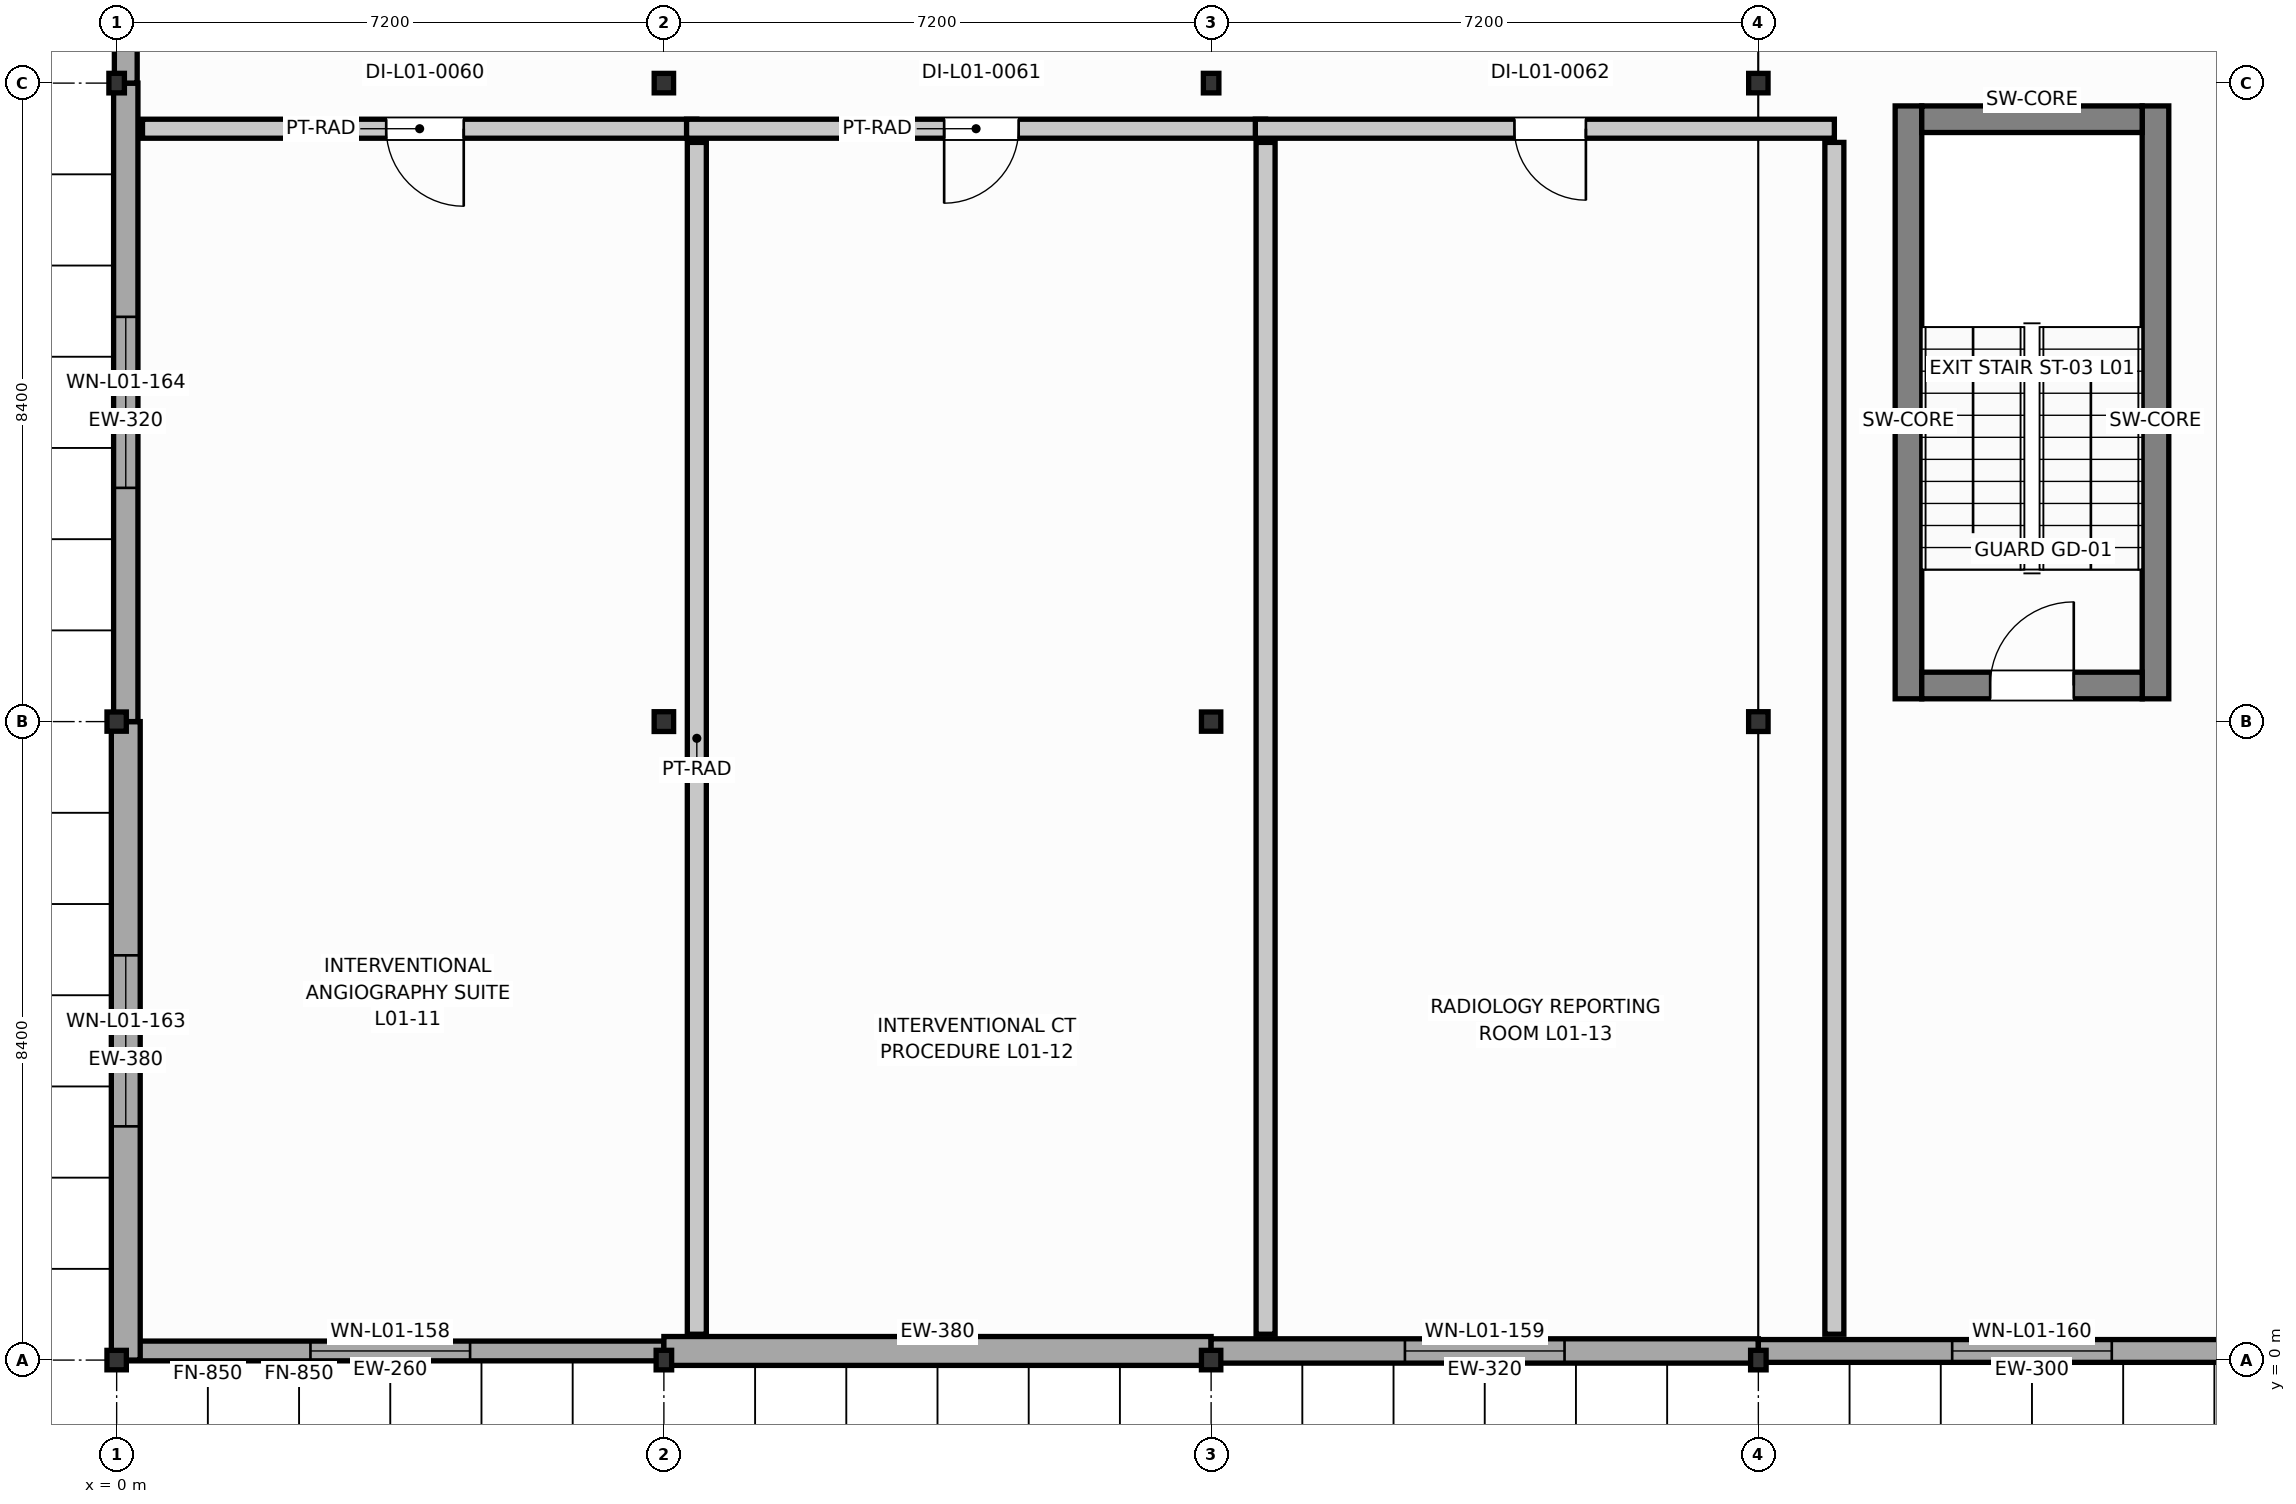
"""IFC4 building model, lengths in metres.
Left out: names, types, materials, properties, quantities, classifications, styles, units other than length and angle.
Written with IfcOpenShell. Run it as: python <this file> out.ifc"""

import sys

from ifc_helpers import new_model, si_unit, direction, frame, frame_2d, origin, origin_with_axes, origin_2d, place, context, subcontext, project, spatial, rectangle, i_section, extrude, element, fill, save


model = new_model("IFC4")
c1 = context("Model", 3, precision=1e-05, world=origin(), true_north=direction((0.0, 1.0)))
c2 = subcontext(c1, "Body", "Model", "MODEL_VIEW")
j1 = project(units=[si_unit("LENGTHUNIT", "METRE"), si_unit("PLANEANGLEUNIT", "RADIAN")], contexts=[c1])
p1 = place(None, origin())
s1 = spatial("IfcSite", under=j1, at=p1, CompositionType="ELEMENT")
p2 = place(p1, origin())
s2 = spatial("IfcBuilding", under=s1, at=p2, CompositionType="ELEMENT")
p3 = place(p2, frame((0.0, 0.0, 4.8)))
s3 = spatial("IfcBuildingStorey", under=s2, at=p3, CompositionType="ELEMENT", Elevation=4.8)
p4 = place(p3, origin_with_axes())
e1 = element("IfcColumn", 1, at=p4, inside=s3, PredefinedType="COLUMN", context=c2, shape_type="SweptSolid", body=[
    extrude(i_section(OverallWidth=0.255, OverallDepth=0.256, WebThickness=0.01, FlangeThickness=0.016, FilletRadius=0.013, at=origin_2d()), origin(), (0.0, 0.0, 1.0), 4.2),
])
p5 = place(p3, frame((0.0, 8.4, 0.0), z_axis=(0.0, 0.0, 1.0), x_axis=(1.0, 0.0, 0.0)))
e2 = element("IfcColumn", 2, at=p5, inside=s3, PredefinedType="COLUMN", context=c2, shape_type="SweptSolid", body=[
    extrude(i_section(OverallWidth=0.254, OverallDepth=0.253, WebThickness=0.009, FlangeThickness=0.014, FilletRadius=0.013, at=origin_2d()), origin(), (0.0, 0.0, 1.0), 4.2),
])
for number, where, z_axis, x_axis in (
    (3, (0.0, 16.8, 0.0), (0.0, 0.0, 1.0), (1.0, 0.0, 0.0)),
    (4, (7.2, 0.0, 0.0), (0.0, 0.0, 1.0), (1.0, 0.0, 0.0)),
):
    element("IfcColumn", number, at=place(p3, frame(where, z_axis=z_axis, x_axis=x_axis)), inside=s3, PredefinedType="COLUMN", context=c2, shape_type="SweptSolid", body=[
        extrude(i_section(OverallWidth=0.204, OverallDepth=0.257, WebThickness=0.009, FlangeThickness=0.016, FilletRadius=0.013, at=origin_2d()), origin(), (0.0, 0.0, 1.0), 4.2),
    ])
p6 = place(p3, frame((7.2, 8.4, 0.0), z_axis=(0.0, 0.0, 1.0), x_axis=(1.0, 0.0, 0.0)))
e5 = element("IfcColumn", 5, at=p6, inside=s3, PredefinedType="COLUMN", context=c2, shape_type="SweptSolid", body=[
    extrude(i_section(OverallWidth=0.256, OverallDepth=0.26, WebThickness=0.011, FlangeThickness=0.017, FilletRadius=0.013, at=origin_2d()), origin(), (0.0, 0.0, 1.0), 4.2),
])
for number, where, z_axis, x_axis in (
    (6, (7.2, 16.8, 0.0), (0.0, 0.0, 1.0), (1.0, 0.0, 0.0)),
    (7, (14.4, 0.0, 0.0), (0.0, 0.0, 1.0), (1.0, 0.0, 0.0)),
):
    element("IfcColumn", number, at=place(p3, frame(where, z_axis=z_axis, x_axis=x_axis)), inside=s3, PredefinedType="COLUMN", context=c2, shape_type="SweptSolid", body=[
        extrude(i_section(OverallWidth=0.255, OverallDepth=0.256, WebThickness=0.01, FlangeThickness=0.016, FilletRadius=0.013, at=origin_2d()), origin(), (0.0, 0.0, 1.0), 4.2),
    ])
p7 = place(p3, frame((14.4, 8.4, 0.0), z_axis=(0.0, 0.0, 1.0), x_axis=(1.0, 0.0, 0.0)))
e8 = element("IfcColumn", 8, at=p7, inside=s3, PredefinedType="COLUMN", context=c2, shape_type="SweptSolid", body=[
    extrude(i_section(OverallWidth=0.254, OverallDepth=0.253, WebThickness=0.009, FlangeThickness=0.014, FilletRadius=0.013, at=origin_2d()), origin(), (0.0, 0.0, 1.0), 4.2),
])
for number, where, z_axis, x_axis in (
    (9, (14.4, 16.8, 0.0), (0.0, 0.0, 1.0), (1.0, 0.0, 0.0)),
    (10, (21.6, 0.0, 0.0), (0.0, 0.0, 1.0), (1.0, 0.0, 0.0)),
):
    element("IfcColumn", number, at=place(p3, frame(where, z_axis=z_axis, x_axis=x_axis)), inside=s3, PredefinedType="COLUMN", context=c2, shape_type="SweptSolid", body=[
        extrude(i_section(OverallWidth=0.204, OverallDepth=0.257, WebThickness=0.009, FlangeThickness=0.016, FilletRadius=0.013, at=origin_2d()), origin(), (0.0, 0.0, 1.0), 4.2),
    ])
p8 = place(p3, frame((21.6, 8.4, 0.0), z_axis=(0.0, 0.0, 1.0), x_axis=(1.0, 0.0, 0.0)))
e11 = element("IfcColumn", 11, at=p8, inside=s3, PredefinedType="COLUMN", context=c2, shape_type="SweptSolid", body=[
    extrude(i_section(OverallWidth=0.256, OverallDepth=0.26, WebThickness=0.011, FlangeThickness=0.017, FilletRadius=0.013, at=origin_2d()), origin(), (0.0, 0.0, 1.0), 4.2),
])
p9 = place(p3, frame((21.6, 16.8, 0.0), z_axis=(0.0, 0.0, 1.0), x_axis=(1.0, 0.0, 0.0)))
e12 = element("IfcColumn", 12, at=p9, inside=s3, PredefinedType="COLUMN", context=c2, shape_type="SweptSolid", body=[
    extrude(i_section(OverallWidth=0.255, OverallDepth=0.256, WebThickness=0.01, FlangeThickness=0.016, FilletRadius=0.013, at=origin_2d()), origin(), (0.0, 0.0, 1.0), 4.2),
])
for number, where, z_axis, x_axis in (
    (13, (23.575, 8.7, 0.0), (0.0, 0.0, 1.0), (0.0, 1.0, 0.0)),
    (14, (26.825, 8.7, 0.0), (0.0, 0.0, 1.0), (0.0, 1.0, 0.0)),
):
    element("IfcWall", number, at=place(p3, frame(where, z_axis=z_axis, x_axis=x_axis)), inside=s3, PredefinedType="SHEAR", context=c2, shape_type="SweptSolid", body=[
        extrude(rectangle(XDim=7.8, YDim=0.35, at=frame_2d((3.9, 0.0))), origin(), (0.0, 0.0, 1.0), 3.96),
    ])
p10 = place(p3, frame((23.75, 16.325, 0.0), z_axis=(0.0, 0.0, 1.0), x_axis=(1.0, 0.0, 0.0)))
e15 = element("IfcWall", 15, at=p10, inside=s3, PredefinedType="SHEAR", context=c2, shape_type="SweptSolid", body=[
    extrude(rectangle(XDim=2.9, YDim=0.35, at=frame_2d((1.45, 0.0))), origin(), (0.0, 0.0, 1.0), 3.96),
])
p11 = place(p3, frame((23.75, 8.875, 0.0), z_axis=(0.0, 0.0, 1.0), x_axis=(1.0, 0.0, 0.0)))
e16 = element("IfcWall", 16, at=p11, inside=s3, PredefinedType="SHEAR", context=c2, shape_type="SweptSolid", body=[
    extrude(rectangle(XDim=2.9, YDim=0.35, at=frame_2d((1.45, 0.0))), origin(), (0.0, 0.0, 1.0), 3.96),
])
p12 = place(p11, frame((0.9, 0.0, 0.0)))
e17 = element("IfcOpeningElement", 17, at=p12, cuts=e16, PredefinedType="OPENING", context=c2, shape_type="SweptSolid", body=[
    extrude(rectangle(XDim=1.1, YDim=2.15, at=frame_2d((0.55, 1.075))), frame((0.0, 0.185, 0.0), z_axis=(0.0, -1.0, 0.0), x_axis=(1.0, 0.0, 0.0)), (0.0, 0.0, 1.0), 0.37),
])
p13 = place(p3, frame((0.0, 0.12, 0.0), z_axis=(0.0, 0.0, 1.0), x_axis=(1.0, 0.0, 0.0)))
e18 = element("IfcWall", 18, at=p13, inside=s3, PredefinedType="SOLIDWALL", context=c2, shape_type="SweptSolid", body=[
    extrude(rectangle(XDim=7.2, YDim=0.26, at=frame_2d((3.6, 0.0))), origin(), (0.0, 0.0, 1.0), 3.482),
])
p14 = place(p13, frame((2.55, 0.0, 0.95)))
e19 = element("IfcOpeningElement", 19, at=p14, cuts=e18, PredefinedType="OPENING", context=c2, shape_type="SweptSolid", body=[
    extrude(rectangle(XDim=2.1, YDim=1.35, at=frame_2d((1.05, 0.675))), frame((0.0, 0.14, 0.0), z_axis=(0.0, -1.0, 0.0), x_axis=(1.0, 0.0, 0.0)), (0.0, 0.0, 1.0), 0.28),
])
p15 = place(p3, frame((7.2, 0.12, 0.0), z_axis=(0.0, 0.0, 1.0), x_axis=(1.0, 0.0, 0.0)))
e20 = element("IfcWall", 20, at=p15, inside=s3, PredefinedType="SOLIDWALL", context=c2, shape_type="SweptSolid", body=[
    extrude(rectangle(XDim=7.2, YDim=0.38, at=frame_2d((3.6, 0.0))), origin(), (0.0, 0.0, 1.0), 3.482),
])
p16 = place(p3, frame((14.4, 0.12, 0.0), z_axis=(0.0, 0.0, 1.0), x_axis=(1.0, 0.0, 0.0)))
e21 = element("IfcWall", 21, at=p16, inside=s3, PredefinedType="SOLIDWALL", context=c2, shape_type="SweptSolid", body=[
    extrude(rectangle(XDim=7.2, YDim=0.32, at=frame_2d((3.6, 0.0))), origin(), (0.0, 0.0, 1.0), 3.482),
])
p17 = place(p16, frame((2.55, 0.0, 0.95)))
e22 = element("IfcOpeningElement", 22, at=p17, cuts=e21, PredefinedType="OPENING", context=c2, shape_type="SweptSolid", body=[
    extrude(rectangle(XDim=2.1, YDim=1.55, at=frame_2d((1.05, 0.775))), frame((0.0, 0.17, 0.0), z_axis=(0.0, -1.0, 0.0), x_axis=(1.0, 0.0, 0.0)), (0.0, 0.0, 1.0), 0.34),
])
p18 = place(p3, frame((21.6, 0.12, 0.0), z_axis=(0.0, 0.0, 1.0), x_axis=(1.0, 0.0, 0.0)))
e23 = element("IfcWall", 23, at=p18, inside=s3, PredefinedType="SOLIDWALL", context=c2, shape_type="SweptSolid", body=[
    extrude(rectangle(XDim=7.2, YDim=0.3, at=frame_2d((3.6, 0.0))), origin(), (0.0, 0.0, 1.0), 3.482),
])
p19 = place(p18, frame((2.55, 0.0, 0.95)))
e24 = element("IfcOpeningElement", 24, at=p19, cuts=e23, PredefinedType="OPENING", context=c2, shape_type="SweptSolid", body=[
    extrude(rectangle(XDim=2.1, YDim=1.75, at=frame_2d((1.05, 0.875))), frame((0.0, 0.16, 0.0), z_axis=(0.0, -1.0, 0.0), x_axis=(1.0, 0.0, 0.0)), (0.0, 0.0, 1.0), 0.32),
])
p20 = place(p3, frame((0.12, 0.0, 0.0), z_axis=(0.0, 0.0, 1.0), x_axis=(0.0, 1.0, 0.0)))
e25 = element("IfcWall", 25, at=p20, inside=s3, PredefinedType="SOLIDWALL", context=c2, shape_type="SweptSolid", body=[
    extrude(rectangle(XDim=8.4, YDim=0.38, at=frame_2d((4.2, 0.0))), origin(), (0.0, 0.0, 1.0), 3.482),
])
p21 = place(p20, frame((3.075, 0.0, 0.95)))
e26 = element("IfcOpeningElement", 26, at=p21, cuts=e25, PredefinedType="OPENING", context=c2, shape_type="SweptSolid", body=[
    extrude(rectangle(XDim=2.25, YDim=1.55, at=frame_2d((1.125, 0.775))), frame((0.0, 0.2, 0.0), z_axis=(0.0, -1.0, 0.0), x_axis=(1.0, 0.0, 0.0)), (0.0, 0.0, 1.0), 0.4),
])
p22 = place(p3, frame((0.12, 8.4, 0.0), z_axis=(0.0, 0.0, 1.0), x_axis=(0.0, 1.0, 0.0)))
e27 = element("IfcWall", 27, at=p22, inside=s3, PredefinedType="SOLIDWALL", context=c2, shape_type="SweptSolid", body=[
    extrude(rectangle(XDim=8.4, YDim=0.32, at=frame_2d((4.2, 0.0))), origin(), (0.0, 0.0, 1.0), 3.482),
])
p23 = place(p22, frame((3.075, 0.0, 0.95)))
e28 = element("IfcOpeningElement", 28, at=p23, cuts=e27, PredefinedType="OPENING", context=c2, shape_type="SweptSolid", body=[
    extrude(rectangle(XDim=2.25, YDim=1.75, at=frame_2d((1.125, 0.875))), frame((0.0, 0.17, 0.0), z_axis=(0.0, -1.0, 0.0), x_axis=(1.0, 0.0, 0.0)), (0.0, 0.0, 1.0), 0.34),
])
p24 = place(p3, frame((0.12, 16.8, 0.0), z_axis=(0.0, 0.0, 1.0), x_axis=(0.0, 1.0, 0.0)))
e29 = element("IfcWall", 29, at=p24, inside=s3, PredefinedType="SOLIDWALL", context=c2, shape_type="SweptSolid", body=[
    extrude(rectangle(XDim=8.4, YDim=0.3, at=frame_2d((4.2, 0.0))), origin(), (0.0, 0.0, 1.0), 3.091),
])
p25 = place(p24, frame((3.0, 0.0, 0.95)))
e30 = element("IfcOpeningElement", 30, at=p25, cuts=e29, PredefinedType="OPENING", context=c2, shape_type="SweptSolid", body=[
    extrude(rectangle(XDim=2.4, YDim=1.15, at=frame_2d((1.2, 0.575))), frame((0.0, 0.16, 0.0), z_axis=(0.0, -1.0, 0.0), x_axis=(1.0, 0.0, 0.0)), (0.0, 0.0, 1.0), 0.32),
])
p26 = place(p3, frame((0.34, 16.2, 0.0), z_axis=(0.0, 0.0, 1.0), x_axis=(1.0, 0.0, 0.0)))
e31 = element("IfcWall", 31, at=p26, inside=s3, PredefinedType="SOLIDWALL", context=c2, shape_type="SweptSolid", body=[
    extrude(rectangle(XDim=7.293, YDim=0.25, at=frame_2d((3.646, 0.0))), origin(), (0.0, 0.0, 1.0), 3.532),
])
p27 = place(p26, frame((3.207, 0.0, 0.0)))
e32 = element("IfcOpeningElement", 32, at=p27, cuts=e31, PredefinedType="OPENING", context=c2, shape_type="SweptSolid", body=[
    extrude(rectangle(XDim=1.02, YDim=2.05, at=frame_2d((0.51, 1.025))), frame((0.0, 0.135, 0.0), z_axis=(0.0, -1.0, 0.0), x_axis=(1.0, 0.0, 0.0)), (0.0, 0.0, 1.0), 0.27),
])
p28 = place(p3, frame((7.633, 16.02, 0.0), z_axis=(0.0, 0.0, 1.0), x_axis=(0.0, -1.0, 0.0)))
e33 = element("IfcWall", 33, at=p28, inside=s3, PredefinedType="SOLIDWALL", context=c2, shape_type="SweptSolid", body=[
    extrude(rectangle(XDim=15.68, YDim=0.25, at=frame_2d((7.84, 0.0))), origin(), (0.0, 0.0, 1.0), 3.532),
])
p29 = place(p3, frame((7.498, 16.2, 0.0), z_axis=(0.0, 0.0, 1.0), x_axis=(1.0, 0.0, 0.0)))
e34 = element("IfcWall", 34, at=p29, inside=s3, PredefinedType="SOLIDWALL", context=c2, shape_type="SweptSolid", body=[
    extrude(rectangle(XDim=7.618, YDim=0.25, at=frame_2d((3.809, 0.0))), origin(), (0.0, 0.0, 1.0), 3.532),
])
p30 = place(p29, frame((3.389, 0.0, 0.0)))
e35 = element("IfcOpeningElement", 35, at=p30, cuts=e34, PredefinedType="OPENING", context=c2, shape_type="SweptSolid", body=[
    extrude(rectangle(XDim=0.98, YDim=2.05, at=frame_2d((0.49, 1.025))), frame((0.0, 0.135, 0.0), z_axis=(0.0, -1.0, 0.0), x_axis=(1.0, 0.0, 0.0)), (0.0, 0.0, 1.0), 0.27),
])
p31 = place(p3, frame((15.117, 16.02, 0.0), z_axis=(0.0, 0.0, 1.0), x_axis=(0.0, -1.0, 0.0)))
e36 = element("IfcWall", 36, at=p31, inside=s3, PredefinedType="SOLIDWALL", context=c2, shape_type="SweptSolid", body=[
    extrude(rectangle(XDim=15.68, YDim=0.25, at=frame_2d((7.84, 0.0))), origin(), (0.0, 0.0, 1.0), 3.535),
])
p32 = place(p3, frame((14.982, 16.2, 0.0), z_axis=(0.0, 0.0, 1.0), x_axis=(1.0, 0.0, 0.0)))
e37 = element("IfcWall", 37, at=p32, inside=s3, PredefinedType="SOLIDWALL", context=c2, shape_type="SweptSolid", body=[
    extrude(rectangle(XDim=7.618, YDim=0.25, at=frame_2d((3.809, 0.0))), origin(), (0.0, 0.0, 1.0), 3.532),
])
p33 = place(p32, frame((3.409, 0.0, 0.0)))
e38 = element("IfcOpeningElement", 38, at=p33, cuts=e37, PredefinedType="OPENING", context=c2, shape_type="SweptSolid", body=[
    extrude(rectangle(XDim=0.94, YDim=2.05, at=frame_2d((0.47, 1.025))), frame((0.0, 0.135, 0.0), z_axis=(0.0, -1.0, 0.0), x_axis=(1.0, 0.0, 0.0)), (0.0, 0.0, 1.0), 0.27),
])
p34 = place(p3, frame((22.6, 16.02, 0.0), z_axis=(0.0, 0.0, 1.0), x_axis=(0.0, -1.0, 0.0)))
e39 = element("IfcWall", 39, at=p34, inside=s3, PredefinedType="SOLIDWALL", context=c2, shape_type="SweptSolid", body=[
    extrude(rectangle(XDim=15.68, YDim=0.25, at=frame_2d((7.84, 0.0))), origin(), (0.0, 0.0, 1.0), 3.532),
])
p35 = place(p12, origin())
e40 = element("IfcDoor", 40, at=p35, inside=s3, OperationType="SINGLE_SWING_RIGHT", PredefinedType="DOOR", context=c2, shape_type="SweptSolid", body=[
    extrude(rectangle(XDim=1.1, YDim=2.15, at=frame_2d((0.55, 1.075))), frame((0.0, 0.025, 0.0), z_axis=(0.0, -1.0, 0.0), x_axis=(1.0, 0.0, 0.0)), (0.0, 0.0, 1.0), 0.05),
])
fill(e17, e40)
p36 = place(p14, origin())
e41 = element("IfcWindow", 41, at=p36, inside=s3, PartitioningType="SINGLE_PANEL", PredefinedType="WINDOW", context=c2, shape_type="SweptSolid", body=[
    extrude(rectangle(XDim=2.1, YDim=1.35, at=frame_2d((1.05, 0.675))), frame((0.0, 0.03, 0.0), z_axis=(0.0, -1.0, 0.0), x_axis=(1.0, 0.0, 0.0)), (0.0, 0.0, 1.0), 0.06),
])
fill(e19, e41)
p37 = place(p17, origin())
e42 = element("IfcWindow", 42, at=p37, inside=s3, PartitioningType="SINGLE_PANEL", PredefinedType="WINDOW", context=c2, shape_type="SweptSolid", body=[
    extrude(rectangle(XDim=2.1, YDim=1.55, at=frame_2d((1.05, 0.775))), frame((0.0, 0.03, 0.0), z_axis=(0.0, -1.0, 0.0), x_axis=(1.0, 0.0, 0.0)), (0.0, 0.0, 1.0), 0.06),
])
fill(e22, e42)
p38 = place(p19, origin())
e43 = element("IfcWindow", 43, at=p38, inside=s3, PartitioningType="SINGLE_PANEL", PredefinedType="WINDOW", context=c2, shape_type="SweptSolid", body=[
    extrude(rectangle(XDim=2.1, YDim=1.75, at=frame_2d((1.05, 0.875))), frame((0.0, 0.03, 0.0), z_axis=(0.0, -1.0, 0.0), x_axis=(1.0, 0.0, 0.0)), (0.0, 0.0, 1.0), 0.06),
])
fill(e24, e43)
p39 = place(p21, origin())
e44 = element("IfcWindow", 44, at=p39, inside=s3, PartitioningType="SINGLE_PANEL", PredefinedType="WINDOW", context=c2, shape_type="SweptSolid", body=[
    extrude(rectangle(XDim=2.25, YDim=1.55, at=frame_2d((1.125, 0.775))), frame((0.0, 0.03, 0.0), z_axis=(0.0, -1.0, 0.0), x_axis=(1.0, 0.0, 0.0)), (0.0, 0.0, 1.0), 0.06),
])
fill(e26, e44)
p40 = place(p23, origin())
e45 = element("IfcWindow", 45, at=p40, inside=s3, PartitioningType="SINGLE_PANEL", PredefinedType="WINDOW", context=c2, shape_type="SweptSolid", body=[
    extrude(rectangle(XDim=2.25, YDim=1.75, at=frame_2d((1.125, 0.875))), frame((0.0, 0.03, 0.0), z_axis=(0.0, -1.0, 0.0), x_axis=(1.0, 0.0, 0.0)), (0.0, 0.0, 1.0), 0.06),
])
fill(e28, e45)
p41 = place(p27, frame((1.02, 0.0, 0.0), z_axis=(0.0, 0.0, 1.0), x_axis=(-1.0, 0.0, 0.0)))
e46 = element("IfcDoor", 46, at=p41, inside=s3, OperationType="SINGLE_SWING_LEFT", PredefinedType="DOOR", context=c2, shape_type="SweptSolid", body=[
    extrude(rectangle(XDim=1.02, YDim=2.05, at=frame_2d((0.51, 1.025))), frame((0.0, 0.025, 0.0), z_axis=(0.0, -1.0, 0.0), x_axis=(1.0, 0.0, 0.0)), (0.0, 0.0, 1.0), 0.05),
])
fill(e32, e46)
p42 = place(p30, frame((0.98, 0.0, 0.0), z_axis=(0.0, 0.0, 1.0), x_axis=(-1.0, 0.0, 0.0)))
e47 = element("IfcDoor", 47, at=p42, inside=s3, OperationType="SINGLE_SWING_RIGHT", PredefinedType="DOOR", context=c2, shape_type="SweptSolid", body=[
    extrude(rectangle(XDim=0.98, YDim=2.05, at=frame_2d((0.49, 1.025))), frame((0.0, 0.025, 0.0), z_axis=(0.0, -1.0, 0.0), x_axis=(1.0, 0.0, 0.0)), (0.0, 0.0, 1.0), 0.05),
])
fill(e35, e47)
p43 = place(p33, frame((0.94, 0.0, 0.0), z_axis=(0.0, 0.0, 1.0), x_axis=(-1.0, 0.0, 0.0)))
e48 = element("IfcDoor", 48, at=p43, inside=s3, OperationType="SINGLE_SWING_LEFT", PredefinedType="DOOR", context=c2, shape_type="SweptSolid", body=[
    extrude(rectangle(XDim=0.94, YDim=2.05, at=frame_2d((0.47, 1.025))), frame((0.0, 0.025, 0.0), z_axis=(0.0, -1.0, 0.0), x_axis=(1.0, 0.0, 0.0)), (0.0, 0.0, 1.0), 0.05),
])
fill(e38, e48)
save(model, sys.argv[1])
